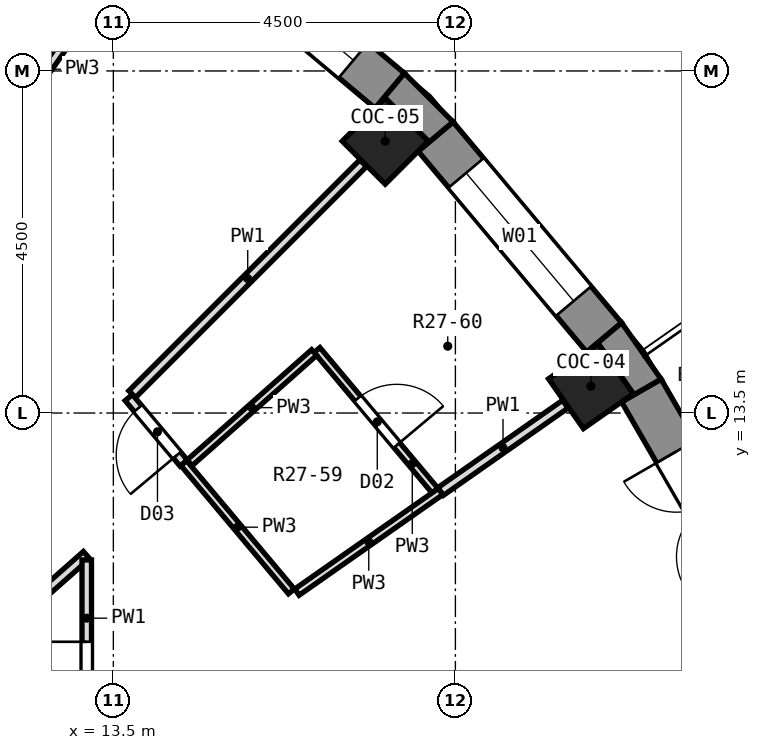
"""IFC4 building model, lengths in metres.
Left out: names, types, materials, properties, quantities, classifications, styles, units other than length and angle.
Written with IfcOpenShell. Run it as: python <this file> out.ifc"""

import sys

from ifc_helpers import new_model, si_unit, direction, frame, frame_2d, origin, origin_2d, place, context, subcontext, project, spatial, polyline, rectangle, outline, extrude, element, fill, save


model = new_model("IFC4")
c1 = context("Model", 3, precision=1e-05, world=origin(), true_north=direction((0.0, 1.0)))
c2 = subcontext(c1, "Body", "Model", "MODEL_VIEW")
j1 = project(units=[si_unit("LENGTHUNIT", "METRE"), si_unit("PLANEANGLEUNIT", "RADIAN")], contexts=[c1])
p1 = place(None, origin())
s1 = spatial("IfcSite", under=j1, at=p1, CompositionType="ELEMENT")
p2 = place(p1, origin())
s2 = spatial("IfcBuilding", under=s1, at=p2, CompositionType="ELEMENT")
p3 = place(p2, frame((0.0, 0.0, 180.6)))
s3 = spatial("IfcBuildingStorey", under=s2, at=p3, CompositionType="ELEMENT", Elevation=180.6)
for number, where, z_axis, x_axis in (
    (1, (19.782, 13.852, 0.0), (0.0, 0.0, 1.0), (0.819, 0.574, 0.0)),
    (2, (17.077, 17.077, 0.0), (0.0, 0.0, 1.0), (0.707, 0.707, 0.0)),
):
    element("IfcColumn", number, at=place(p3, frame(where, z_axis=z_axis, x_axis=x_axis)), inside=s3, PredefinedType="COLUMN", context=c2, shape_type="SweptSolid", body=[
        extrude(rectangle(XDim=0.8, YDim=0.8, at=origin_2d()), origin(), (0.0, 0.0, 1.0), 3.3),
    ])
p4 = place(p3, frame((22.171, 10.809, 0.0), z_axis=(0.0, 0.0, 1.0), x_axis=(-0.499998129301, 0.86602648383, 0.0)))
e3 = element("IfcWall", 3, at=p4, inside=s3, PredefinedType="SOLIDWALL", context=c2, shape_type="SweptSolid", body=[
    extrude(rectangle(XDim=3.45, YDim=0.6, at=frame_2d((1.725, 0.0))), origin(), (0.0, 0.0, 1.0), 2.85),
])
p5 = place(p4, frame((0.925, 0.0, 0.0)))
e4 = element("IfcOpeningElement", 4, at=p5, cuts=e3, PredefinedType="OPENING", context=c2, shape_type="SweptSolid", body=[
    extrude(rectangle(XDim=1.6, YDim=2.4, at=frame_2d((0.8, 1.2))), frame((0.0, 0.312, 0.0), z_axis=(0.0, -1.0, 0.0), x_axis=(1.0, 0.0, 0.0)), (0.0, 0.0, 1.0), 0.624),
])
p6 = place(p3, frame((19.957, 14.494, 0.0), z_axis=(0.0, 0.0, 1.0), x_axis=(-0.642770398358, 0.766058884809, 0.0)))
e5 = element("IfcWall", 5, at=p6, inside=s3, PredefinedType="SOLIDWALL", context=c2, shape_type="SweptSolid", body=[
    extrude(rectangle(XDim=3.449, YDim=0.6, at=frame_2d((1.725, 0.0))), origin(), (0.0, 0.0, 1.0), 2.85),
])
p7 = place(p6, frame((0.625, 0.0, 0.9)))
e6 = element("IfcOpeningElement", 6, at=p7, cuts=e5, PredefinedType="OPENING", context=c2, shape_type="SweptSolid", body=[
    extrude(rectangle(XDim=2.2, YDim=1.8, at=frame_2d((1.1, 0.9))), frame((0.0, 0.312, 0.0), z_axis=(0.0, -1.0, 0.0), x_axis=(1.0, 0.0, 0.0)), (0.0, 0.0, 1.0), 0.624),
])
p8 = place(p3, frame((17.137, 17.74, 0.0), z_axis=(0.0, 0.0, 1.0), x_axis=(-0.766058884809, 0.642770398358, 0.0)))
e7 = element("IfcWall", 7, at=p8, inside=s3, PredefinedType="SOLIDWALL", context=c2, shape_type="SweptSolid", body=[
    extrude(rectangle(XDim=3.449, YDim=0.6, at=frame_2d((1.725, 0.0))), origin(), (0.0, 0.0, 1.0), 2.85),
])
p9 = place(p8, frame((0.625, 0.0, 0.9)))
e8 = element("IfcOpeningElement", 8, at=p9, cuts=e7, PredefinedType="OPENING", context=c2, shape_type="SweptSolid", body=[
    extrude(rectangle(XDim=2.2, YDim=1.8, at=frame_2d((1.1, 0.9))), frame((0.0, 0.312, 0.0), z_axis=(0.0, -1.0, 0.0), x_axis=(1.0, 0.0, 0.0)), (0.0, 0.0, 1.0), 0.624),
])
p10 = place(p3, origin())
e9 = element("IfcWall", 9, at=p10, inside=s3, PredefinedType="SOLIDWALL", context=c2, shape_type="SweptSolid", body=[
    extrude(outline(polyline([(20.706, 13.946), (20.187, 14.687), (19.727, 14.302), (19.881, 14.409), (20.34, 13.754), (20.186, 13.646), (20.706, 13.946)])), origin(), (0.0, 0.0, 1.0), 2.85),
])
p11 = place(p3, origin())
e10 = element("IfcWall", 10, at=p11, inside=s3, PredefinedType="SOLIDWALL", context=c2, shape_type="SweptSolid", body=[
    extrude(outline(polyline([(17.33, 17.969), (16.944, 17.51), (17.077, 17.642), (17.642, 17.077), (17.51, 16.944), (17.969, 17.33), (17.33, 17.969)])), origin(), (0.0, 0.0, 1.0), 2.85),
])
p12 = place(p3, frame((14.425, 12.842, 0.0), z_axis=(0.0, 0.0, 1.0), x_axis=(0.642729690631, -0.766093039246, 0.0)))
e11 = element("IfcWall", 11, at=p12, inside=s3, PredefinedType="PARTITIONING", context=c2, shape_type="SweptSolid", body=[
    extrude(rectangle(XDim=2.205, YDim=0.1, at=frame_2d((1.102, 0.0))), origin(), (0.0, 0.0, 1.0), 2.85),
])
p13 = place(p3, frame((13.703, 13.703, 0.0), z_axis=(0.0, 0.0, 1.0), x_axis=(0.642682228496, -0.766132856087, 0.0)))
e12 = element("IfcWall", 12, at=p13, inside=s3, PredefinedType="PARTITIONING", context=c2, shape_type="SweptSolid", body=[
    extrude(rectangle(XDim=1.123, YDim=0.125, at=frame_2d((0.562, 0.0))), origin(), (0.0, 0.0, 1.0), 2.85),
])
p14 = place(p13, frame((0.188, 0.0, 0.0)))
e13 = element("IfcOpeningElement", 13, at=p14, cuts=e12, PredefinedType="OPENING", context=c2, shape_type="SweptSolid", body=[
    extrude(rectangle(XDim=0.8, YDim=2.1, at=frame_2d((0.4, 1.05))), frame((0.0, 0.074, 0.0), z_axis=(0.0, -1.0, 0.0), x_axis=(1.0, 0.0, 0.0)), (0.0, 0.0, 1.0), 0.149),
])
p15 = place(p3, frame((16.179, 14.329, 0.0), z_axis=(0.0, 0.0, 1.0), x_axis=(0.64280558307, -0.7660293613, 0.0)))
e14 = element("IfcWall", 14, at=p15, inside=s3, PredefinedType="PARTITIONING", context=c2, shape_type="SweptSolid", body=[
    extrude(rectangle(XDim=2.415, YDim=0.1, at=frame_2d((1.208, 0.0))), origin(), (0.0, 0.0, 1.0), 2.85),
])
p16 = place(p15, frame((0.833, 0.0, 0.0)))
e15 = element("IfcOpeningElement", 15, at=p16, cuts=e14, PredefinedType="OPENING", context=c2, shape_type="SweptSolid", body=[
    extrude(rectangle(XDim=0.8, YDim=2.1, at=frame_2d((0.4, 1.05))), frame((0.0, 0.062, 0.0), z_axis=(0.0, -1.0, 0.0), x_axis=(1.0, 0.0, 0.0)), (0.0, 0.0, 1.0), 0.124),
])
p17 = place(p3, frame((15.915, 11.144, 0.0), z_axis=(0.0, 0.0, 1.0), x_axis=(0.819157380539, 0.573568815321, 0.0)))
e16 = element("IfcWall", 16, at=p17, inside=s3, PredefinedType="PARTITIONING", context=c2, shape_type="SweptSolid", body=[
    extrude(rectangle(XDim=2.308, YDim=0.1, at=frame_2d((1.154, 0.0))), origin(), (0.0, 0.0, 1.0), 2.85),
])
p18 = place(p3, frame((17.806, 12.468, 0.0), z_axis=(0.0, 0.0, 1.0), x_axis=(0.819060101024, 0.573707722548, 0.0)))
e17 = element("IfcWall", 17, at=p18, inside=s3, PredefinedType="PARTITIONING", context=c2, shape_type="SweptSolid", body=[
    extrude(rectangle(XDim=2.003, YDim=0.125, at=frame_2d((1.001, 0.0))), origin(), (0.0, 0.0, 1.0), 2.85),
])
p19 = place(p3, frame((14.504, 12.845, 0.0), z_axis=(0.0, 0.0, 1.0), x_axis=(0.748608753718, 0.663012016374, 0.0)))
e18 = element("IfcWall", 18, at=p19, inside=s3, PredefinedType="PARTITIONING", context=c2, shape_type="SweptSolid", body=[
    extrude(rectangle(XDim=2.188, YDim=0.1, at=frame_2d((1.094, 0.0))), origin(), (0.0, 0.0, 1.0), 2.85),
])
p20 = place(p3, frame((11.97, 10.59, 0.0), z_axis=(0.0, 0.0, 1.0), x_axis=(0.748916466518, 0.66266441445, 0.0)))
e19 = element("IfcWall", 19, at=p20, inside=s3, PredefinedType="PARTITIONING", context=c2, shape_type="SweptSolid", body=[
    extrude(rectangle(XDim=1.571, YDim=0.125, at=frame_2d((0.786, 0.0))), origin(), (0.0, 0.0, 1.0), 2.85),
])
p21 = place(p3, frame((13.748, 13.748, 0.0), z_axis=(0.0, 0.0, 1.0), x_axis=(0.707106781187, 0.707106781187, 0.0)))
e20 = element("IfcWall", 20, at=p21, inside=s3, PredefinedType="PARTITIONING", context=c2, shape_type="SweptSolid", body=[
    extrude(rectangle(XDim=4.297, YDim=0.125, at=frame_2d((2.148, 0.0))), origin(), (0.0, 0.0, 1.0), 2.85),
])
p22 = place(p3, frame((12.468, 17.806, 0.0), z_axis=(0.0, 0.0, 1.0), x_axis=(0.573568678046, 0.819157476658, 0.0)))
e21 = element("IfcWall", 21, at=p22, inside=s3, PredefinedType="PARTITIONING", context=c2, shape_type="SweptSolid", body=[
    extrude(rectangle(XDim=2.003, YDim=0.125, at=frame_2d((1.001, 0.0))), origin(), (0.0, 0.0, 1.0), 2.85),
])
p23 = place(p3, frame((13.15, 9.351, 0.0), z_axis=(0.0, 0.0, 1.0), x_axis=(0.0, 1.0, 0.0)))
e22 = element("IfcWall", 22, at=p23, inside=s3, PredefinedType="PARTITIONING", context=c2, shape_type="SweptSolid", body=[
    extrude(rectangle(XDim=2.216, YDim=0.125, at=frame_2d((1.108, 0.0))), origin(), (0.0, 0.0, 1.0), 2.85),
])
p24 = place(p23, frame((0.139, 0.0, 0.0)))
e23 = element("IfcOpeningElement", 23, at=p24, cuts=e22, PredefinedType="OPENING", context=c2, shape_type="SweptSolid", body=[
    extrude(rectangle(XDim=1.0, YDim=2.1, at=frame_2d((0.5, 1.05))), frame((0.0, 0.074, 0.0), z_axis=(0.0, -1.0, 0.0), x_axis=(1.0, 0.0, 0.0)), (0.0, 0.0, 1.0), 0.149),
])
p25 = place(p5, origin())
e24 = element("IfcDoor", 24, at=p25, inside=s3, OperationType="DOUBLE_DOOR_SINGLE_SWING", PredefinedType="DOOR", context=c2, shape_type="SweptSolid", body=[
    extrude(rectangle(XDim=1.6, YDim=2.4, at=frame_2d((0.8, 1.2))), frame((0.0, 0.125, 0.0), z_axis=(0.0, -1.0, 0.0), x_axis=(1.0, 0.0, 0.0)), (0.0, 0.0, 1.0), 0.05),
])
fill(e4, e24)
p26 = place(p7, origin())
e25 = element("IfcWindow", 25, at=p26, inside=s3, PartitioningType="SINGLE_PANEL", PredefinedType="WINDOW", context=c2, shape_type="SweptSolid", body=[
    extrude(rectangle(XDim=2.2, YDim=1.8, at=frame_2d((1.1, 0.9))), frame((0.0, 0.18, 0.0), z_axis=(0.0, -1.0, 0.0), x_axis=(1.0, 0.0, 0.0)), (0.0, 0.0, 1.0), 0.06),
])
fill(e6, e25)
p27 = place(p9, origin())
e26 = element("IfcWindow", 26, at=p27, inside=s3, PartitioningType="SINGLE_PANEL", PredefinedType="WINDOW", context=c2, shape_type="SweptSolid", body=[
    extrude(rectangle(XDim=2.2, YDim=1.8, at=frame_2d((1.1, 0.9))), frame((0.0, 0.18, 0.0), z_axis=(0.0, -1.0, 0.0), x_axis=(1.0, 0.0, 0.0)), (0.0, 0.0, 1.0), 0.06),
])
fill(e8, e26)
p28 = place(p24, origin())
e27 = element("IfcDoor", 27, at=p28, inside=s3, OperationType="SINGLE_SWING_RIGHT", PredefinedType="DOOR", context=c2, shape_type="SweptSolid", body=[
    extrude(rectangle(XDim=1.0, YDim=2.1, at=frame_2d((0.5, 1.05))), frame((0.0, 0.025, 0.0), z_axis=(0.0, -1.0, 0.0), x_axis=(1.0, 0.0, 0.0)), (0.0, 0.0, 1.0), 0.05),
])
fill(e23, e27)
p29 = place(p16, origin())
e28 = element("IfcDoor", 28, at=p29, inside=s3, OperationType="SINGLE_SWING_RIGHT", PredefinedType="DOOR", context=c2, shape_type="SweptSolid", body=[
    extrude(rectangle(XDim=0.8, YDim=2.1, at=frame_2d((0.4, 1.05))), frame((0.0, 0.025, 0.0), z_axis=(0.0, -1.0, 0.0), x_axis=(1.0, 0.0, 0.0)), (0.0, 0.0, 1.0), 0.05),
])
fill(e15, e28)
p30 = place(p14, frame((0.8, 0.0, 0.0), z_axis=(0.0, 0.0, 1.0), x_axis=(-1.0, 0.0, 0.0)))
e29 = element("IfcDoor", 29, at=p30, inside=s3, OperationType="SINGLE_SWING_LEFT", PredefinedType="DOOR", context=c2, shape_type="SweptSolid", body=[
    extrude(rectangle(XDim=0.8, YDim=2.1, at=frame_2d((0.4, 1.05))), frame((0.0, 0.025, 0.0), z_axis=(0.0, -1.0, 0.0), x_axis=(1.0, 0.0, 0.0)), (0.0, 0.0, 1.0), 0.05),
])
fill(e13, e29)
save(model, sys.argv[1])
